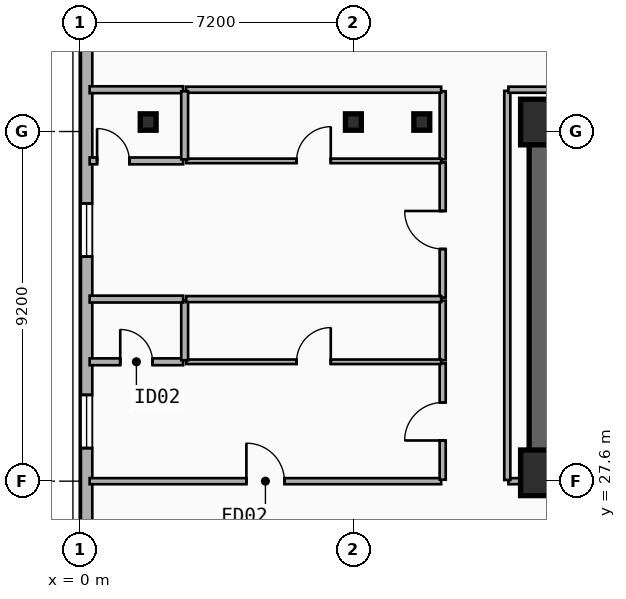
"""IFC4 building model, lengths in metres.
Left out: names, types, materials, properties, quantities, classifications, styles, units other than length and angle.
Written with IfcOpenShell. Run it as: python <this file> out.ifc"""

import sys

from ifc_helpers import new_model, si_unit, direction, frame, frame_2d, origin, origin_2d, place, context, subcontext, project, spatial, rectangle, i_section, extrude, element, fill, save


model = new_model("IFC4")
c1 = context("Model", 3, precision=1e-05, world=origin(), true_north=direction((0.0, 1.0)))
c2 = subcontext(c1, "Body", "Model", "MODEL_VIEW")
j1 = project(units=[si_unit("LENGTHUNIT", "METRE"), si_unit("PLANEANGLEUNIT", "RADIAN")], contexts=[c1])
p1 = place(None, origin())
s1 = spatial("IfcSite", under=j1, at=p1, CompositionType="ELEMENT")
p2 = place(p1, origin())
s2 = spatial("IfcBuilding", under=s1, at=p2, CompositionType="ELEMENT")
p3 = place(p2, frame((0.0, 0.0, 118.8)))
s3 = spatial("IfcBuildingStorey", under=s2, at=p3, CompositionType="ELEMENT", Elevation=118.8)
p4 = place(p3, frame((12.15, 37.05, 0.0), z_axis=(0.0, 0.0, 1.0), x_axis=(1.0, 0.0, 0.0)))
e1 = element("IfcWall", 1, at=p4, inside=s3, PredefinedType="SHEAR", context=c2, shape_type="SweptSolid", body=[
    extrude(rectangle(XDim=33.23, YDim=0.65, at=frame_2d((16.615, 0.0))), origin(), (0.0, 0.0, 1.0), 3.5),
])
p5 = place(p3, frame((21.18, 27.82, 0.0), z_axis=(0.0, 0.0, 1.0), x_axis=(-1.0, 0.0, 0.0)))
e2 = element("IfcWall", 2, at=p5, inside=s3, PredefinedType="SHEAR", context=c2, shape_type="SweptSolid", body=[
    extrude(rectangle(XDim=9.03, YDim=0.65, at=frame_2d((4.515, 0.0))), origin(), (0.0, 0.0, 1.0), 3.5),
])
p6 = place(p5, frame((2.68, 0.0, 0.0)))
e3 = element("IfcOpeningElement", 3, at=p6, cuts=e2, PredefinedType="OPENING", context=c2, shape_type="SweptSolid", body=[
    extrude(rectangle(XDim=1.1, YDim=2.15, at=frame_2d((0.55, 1.075))), frame((0.0, 0.335, 0.0), z_axis=(0.0, -1.0, 0.0), x_axis=(1.0, 0.0, 0.0)), (0.0, 0.0, 1.0), 0.67),
])
p7 = place(p3, frame((12.15, 28.145, 0.0), z_axis=(0.0, 0.0, 1.0), x_axis=(0.0, 1.0, 0.0)))
e4 = element("IfcWall", 4, at=p7, inside=s3, PredefinedType="SHEAR", context=c2, shape_type="SweptSolid", body=[
    extrude(rectangle(XDim=8.58, YDim=0.65, at=frame_2d((4.29, 0.0))), origin(), (0.0, 0.0, 1.0), 3.5),
])
for number, where, z_axis, x_axis in (
    (5, (12.2, 27.82, 0.0), (0.0, 0.0, 1.0), (1.0, 0.0, 0.0)),
    (6, (12.2, 37.05, 0.0), (0.0, 0.0, 1.0), (1.0, 0.0, 0.0)),
):
    element("IfcColumn", number, at=place(p3, frame(where, z_axis=z_axis, x_axis=x_axis)), inside=s3, PredefinedType="COLUMN", context=c2, shape_type="SweptSolid", body=[
        extrude(rectangle(XDim=1.2, YDim=1.2, at=origin_2d()), origin(), (0.0, 0.0, 1.0), 3.5),
    ])
for number, where, z_axis, x_axis in (
    (7, (9.0, 37.05, 0.0), (0.0, 0.0, 1.0), (1.0, 0.0, 0.0)),
    (8, (1.8, 37.05, 0.0), (0.0, 0.0, 1.0), (1.0, 0.0, 0.0)),
    (9, (7.2, 37.05, 0.0), (0.0, 0.0, 1.0), (1.0, 0.0, 0.0)),
):
    element("IfcColumn", number, at=place(p3, frame(where, z_axis=z_axis, x_axis=x_axis)), inside=s3, PredefinedType="COLUMN", context=c2, shape_type="SweptSolid", body=[
        extrude(i_section(OverallWidth=0.418, OverallDepth=0.432, WebThickness=0.035, FlangeThickness=0.056, FilletRadius=0.015, at=origin_2d()), origin(), (0.0, 0.0, 1.0), 3.5),
    ])
p8 = place(p3, frame((0.18, 21.0, 0.0), z_axis=(0.0, 0.0, 1.0), x_axis=(0.0, 1.0, 0.0)))
e10 = element("IfcWall", 10, at=p8, inside=s3, PredefinedType="SOLIDWALL", context=c2, shape_type="SweptSolid", body=[
    extrude(rectangle(XDim=18.0, YDim=0.3, at=frame_2d((9.0, 0.0))), origin(), (0.0, 0.0, 1.0), 3.24),
])
p9 = place(p8, frame((7.47, 0.0, 0.48)))
e11 = element("IfcOpeningElement", 11, at=p9, cuts=e10, PredefinedType="OPENING", context=c2, shape_type="SweptSolid", body=[
    extrude(rectangle(XDim=1.4, YDim=1.8, at=frame_2d((0.7, 0.9))), frame((0.0, 0.16, 0.0), z_axis=(0.0, -1.0, 0.0), x_axis=(1.0, 0.0, 0.0)), (0.0, 0.0, 1.0), 0.32),
])
p10 = place(p8, frame((12.509, 0.0, 0.48)))
e12 = element("IfcOpeningElement", 12, at=p10, cuts=e10, PredefinedType="OPENING", context=c2, shape_type="SweptSolid", body=[
    extrude(rectangle(XDim=1.4, YDim=1.8, at=frame_2d((0.7, 0.9))), frame((0.0, 0.16, 0.0), z_axis=(0.0, -1.0, 0.0), x_axis=(1.0, 0.0, 0.0)), (0.0, 0.0, 1.0), 0.32),
])
p11 = place(p8, frame((0.32, 0.0, 0.65)))
e13 = element("IfcOpeningElement", 13, at=p11, cuts=e10, PredefinedType="OPENING", context=c2, shape_type="SweptSolid", body=[
    extrude(rectangle(XDim=1.4, YDim=1.8, at=frame_2d((0.7, 0.9))), frame((0.0, 0.16, 0.0), z_axis=(0.0, -1.0, 0.0), x_axis=(1.0, 0.0, 0.0)), (0.0, 0.0, 1.0), 0.32),
])
p12 = place(p3, frame((0.26, 27.6, 0.0), z_axis=(0.0, 0.0, 1.0), x_axis=(1.0, 0.0, 0.0)))
e14 = element("IfcWall", 14, at=p12, inside=s3, PredefinedType="PARTITIONING", context=c2, shape_type="SweptSolid", body=[
    extrude(rectangle(XDim=9.25, YDim=0.16, at=frame_2d((4.625, 0.0))), origin(), (0.0, 0.0, 1.0), 2.57),
])
p13 = place(p12, frame((4.125, 0.0, 0.0)))
e15 = element("IfcOpeningElement", 15, at=p13, cuts=e14, PredefinedType="OPENING", context=c2, shape_type="SweptSolid", body=[
    extrude(rectangle(XDim=1.0, YDim=2.15, at=frame_2d((0.5, 1.075))), frame((0.0, 0.09, 0.0), z_axis=(0.0, -1.0, 0.0), x_axis=(1.0, 0.0, 0.0)), (0.0, 0.0, 1.0), 0.18),
])
p14 = place(p3, frame((9.55, 27.64, 0.0), z_axis=(0.0, 0.0, 1.0), x_axis=(0.0, 1.0, 0.0)))
e16 = element("IfcWall", 16, at=p14, inside=s3, PredefinedType="PARTITIONING", context=c2, shape_type="SweptSolid", body=[
    extrude(rectangle(XDim=3.061, YDim=0.16, at=frame_2d((1.531, 0.0))), origin(), (0.0, 0.0, 1.0), 3.24),
])
p15 = place(p14, frame((1.031, 0.0, 0.0)))
e17 = element("IfcOpeningElement", 17, at=p15, cuts=e16, PredefinedType="OPENING", context=c2, shape_type="SweptSolid", body=[
    extrude(rectangle(XDim=1.0, YDim=2.15, at=frame_2d((0.5, 1.075))), frame((0.0, 0.09, 0.0), z_axis=(0.0, -1.0, 0.0), x_axis=(1.0, 0.0, 0.0)), (0.0, 0.0, 1.0), 0.18),
])
p16 = place(p3, frame((9.55, 30.781, 0.0), z_axis=(0.0, 0.0, 1.0), x_axis=(0.0, 1.0, 0.0)))
e18 = element("IfcWall", 18, at=p16, inside=s3, PredefinedType="PARTITIONING", context=c2, shape_type="SweptSolid", body=[
    extrude(rectangle(XDim=1.57, YDim=0.16, at=frame_2d((0.785, 0.0))), origin(), (0.0, 0.0, 1.0), 3.24),
])
p17 = place(p3, frame((9.55, 32.431, 0.0), z_axis=(0.0, 0.0, 1.0), x_axis=(0.0, 1.0, 0.0)))
e19 = element("IfcWall", 19, at=p17, inside=s3, PredefinedType="PARTITIONING", context=c2, shape_type="SweptSolid", body=[
    extrude(rectangle(XDim=3.556, YDim=0.16, at=frame_2d((1.778, 0.0))), origin(), (0.0, 0.0, 1.0), 3.24),
])
p18 = place(p17, frame((1.278, 0.0, 0.0)))
e20 = element("IfcOpeningElement", 20, at=p18, cuts=e19, PredefinedType="OPENING", context=c2, shape_type="SweptSolid", body=[
    extrude(rectangle(XDim=1.0, YDim=2.15, at=frame_2d((0.5, 1.075))), frame((0.0, 0.09, 0.0), z_axis=(0.0, -1.0, 0.0), x_axis=(1.0, 0.0, 0.0)), (0.0, 0.0, 1.0), 0.18),
])
p19 = place(p3, frame((9.55, 36.067, 0.0), z_axis=(0.0, 0.0, 1.0), x_axis=(0.0, 1.0, 0.0)))
e21 = element("IfcWall", 21, at=p19, inside=s3, PredefinedType="PARTITIONING", context=c2, shape_type="SweptSolid", body=[
    extrude(rectangle(XDim=1.793, YDim=0.16, at=frame_2d((0.896, 0.0))), origin(), (0.0, 0.0, 1.0), 2.72),
])
p20 = place(p3, frame((0.26, 37.9, 0.0), z_axis=(0.0, 0.0, 1.0), x_axis=(1.0, 0.0, 0.0)))
e22 = element("IfcWall", 22, at=p20, inside=s3, PredefinedType="PLUMBINGWALL", context=c2, shape_type="SweptSolid", body=[
    extrude(rectangle(XDim=2.46, YDim=0.18, at=frame_2d((1.23, 0.0))), origin(), (0.0, 0.0, 1.0), 3.24),
])
p21 = place(p3, frame((2.8, 37.9, 0.0), z_axis=(0.0, 0.0, 1.0), x_axis=(1.0, 0.0, 0.0)))
e23 = element("IfcWall", 23, at=p21, inside=s3, PredefinedType="PARTITIONING", context=c2, shape_type="SweptSolid", body=[
    extrude(rectangle(XDim=6.71, YDim=0.16, at=frame_2d((3.355, 0.0))), origin(), (0.0, 0.0, 1.0), 3.24),
])
p22 = place(p3, frame((0.26, 30.741, 0.0), z_axis=(0.0, 0.0, 1.0), x_axis=(1.0, 0.0, 0.0)))
e24 = element("IfcWall", 24, at=p22, inside=s3, PredefinedType="PLUMBINGWALL", context=c2, shape_type="SweptSolid", body=[
    extrude(rectangle(XDim=2.46, YDim=0.18, at=frame_2d((1.23, 0.0))), origin(), (0.0, 0.0, 1.0), 2.57),
])
p23 = place(p22, frame((0.805, 0.0, 0.0)))
e25 = element("IfcOpeningElement", 25, at=p23, cuts=e24, PredefinedType="OPENING", context=c2, shape_type="SweptSolid", body=[
    extrude(rectangle(XDim=0.85, YDim=2.1, at=frame_2d((0.425, 1.05))), frame((0.0, 0.1, 0.0), z_axis=(0.0, -1.0, 0.0), x_axis=(1.0, 0.0, 0.0)), (0.0, 0.0, 1.0), 0.2),
])
p24 = place(p3, frame((2.8, 30.741, 0.0), z_axis=(0.0, 0.0, 1.0), x_axis=(1.0, 0.0, 0.0)))
e26 = element("IfcWall", 26, at=p24, inside=s3, PredefinedType="PARTITIONING", context=c2, shape_type="SweptSolid", body=[
    extrude(rectangle(XDim=6.71, YDim=0.12, at=frame_2d((3.355, 0.0))), origin(), (0.0, 0.0, 1.0), 2.57),
])
p25 = place(p24, frame((2.905, 0.0, 0.0)))
e27 = element("IfcOpeningElement", 27, at=p25, cuts=e26, PredefinedType="OPENING", context=c2, shape_type="SweptSolid", body=[
    extrude(rectangle(XDim=0.9, YDim=2.1, at=frame_2d((0.45, 1.05))), frame((0.0, 0.07, 0.0), z_axis=(0.0, -1.0, 0.0), x_axis=(1.0, 0.0, 0.0)), (0.0, 0.0, 1.0), 0.14),
])
p26 = place(p3, frame((2.76, 30.781, 0.0), z_axis=(0.0, 0.0, 1.0), x_axis=(0.0, 1.0, 0.0)))
e28 = element("IfcWall", 28, at=p26, inside=s3, PredefinedType="PLUMBINGWALL", context=c2, shape_type="SweptSolid", body=[
    extrude(rectangle(XDim=1.57, YDim=0.18, at=frame_2d((0.785, 0.0))), origin(), (0.0, 0.0, 1.0), 3.24),
])
p27 = place(p3, frame((0.26, 32.391, 0.0), z_axis=(0.0, 0.0, 1.0), x_axis=(1.0, 0.0, 0.0)))
e29 = element("IfcWall", 29, at=p27, inside=s3, PredefinedType="PLUMBINGWALL", context=c2, shape_type="SweptSolid", body=[
    extrude(rectangle(XDim=2.46, YDim=0.18, at=frame_2d((1.23, 0.0))), origin(), (0.0, 0.0, 1.0), 2.57),
])
p28 = place(p3, frame((2.8, 32.391, 0.0), z_axis=(0.0, 0.0, 1.0), x_axis=(1.0, 0.0, 0.0)))
e30 = element("IfcWall", 30, at=p28, inside=s3, PredefinedType="PARTITIONING", context=c2, shape_type="SweptSolid", body=[
    extrude(rectangle(XDim=6.71, YDim=0.16, at=frame_2d((3.355, 0.0))), origin(), (0.0, 0.0, 1.0), 2.57),
])
p29 = place(p3, frame((0.26, 36.027, 0.0), z_axis=(0.0, 0.0, 1.0), x_axis=(1.0, 0.0, 0.0)))
e31 = element("IfcWall", 31, at=p29, inside=s3, PredefinedType="PLUMBINGWALL", context=c2, shape_type="SweptSolid", body=[
    extrude(rectangle(XDim=2.46, YDim=0.18, at=frame_2d((1.23, 0.0))), origin(), (0.0, 0.0, 1.0), 2.57),
])
p30 = place(p29, frame((0.195, 0.0, 0.0)))
e32 = element("IfcOpeningElement", 32, at=p30, cuts=e31, PredefinedType="OPENING", context=c2, shape_type="SweptSolid", body=[
    extrude(rectangle(XDim=0.85, YDim=2.1, at=frame_2d((0.425, 1.05))), frame((0.0, 0.1, 0.0), z_axis=(0.0, -1.0, 0.0), x_axis=(1.0, 0.0, 0.0)), (0.0, 0.0, 1.0), 0.2),
])
p31 = place(p3, frame((2.8, 36.027, 0.0), z_axis=(0.0, 0.0, 1.0), x_axis=(1.0, 0.0, 0.0)))
e33 = element("IfcWall", 33, at=p31, inside=s3, PredefinedType="PARTITIONING", context=c2, shape_type="SweptSolid", body=[
    extrude(rectangle(XDim=6.71, YDim=0.12, at=frame_2d((3.355, 0.0))), origin(), (0.0, 0.0, 1.0), 2.57),
])
p32 = place(p31, frame((2.905, 0.0, 0.0)))
e34 = element("IfcOpeningElement", 34, at=p32, cuts=e33, PredefinedType="OPENING", context=c2, shape_type="SweptSolid", body=[
    extrude(rectangle(XDim=0.9, YDim=2.1, at=frame_2d((0.45, 1.05))), frame((0.0, 0.07, 0.0), z_axis=(0.0, -1.0, 0.0), x_axis=(1.0, 0.0, 0.0)), (0.0, 0.0, 1.0), 0.14),
])
p33 = place(p3, frame((2.76, 36.067, 0.0), z_axis=(0.0, 0.0, 1.0), x_axis=(0.0, 1.0, 0.0)))
e35 = element("IfcWall", 35, at=p33, inside=s3, PredefinedType="PLUMBINGWALL", context=c2, shape_type="SweptSolid", body=[
    extrude(rectangle(XDim=1.793, YDim=0.18, at=frame_2d((0.896, 0.0))), origin(), (0.0, 0.0, 1.0), 2.72),
])
p34 = place(p3, frame((11.28, 27.6, 0.0), z_axis=(0.0, 0.0, 1.0), x_axis=(1.0, 0.0, 0.0)))
e36 = element("IfcWall", 36, at=p34, inside=s3, PredefinedType="PARTITIONING", context=c2, shape_type="SweptSolid", body=[
    extrude(rectangle(XDim=0.84, YDim=0.16, at=frame_2d((0.42, 0.0))), origin(), (0.0, 0.0, 1.0), 2.28),
])
p35 = place(p3, frame((11.25, 27.63, 0.0), z_axis=(0.0, 0.0, 1.0), x_axis=(0.0, 1.0, 0.0)))
e37 = element("IfcWall", 37, at=p35, inside=s3, PredefinedType="PARTITIONING", context=c2, shape_type="SweptSolid", body=[
    extrude(rectangle(XDim=10.24, YDim=0.16, at=frame_2d((5.12, 0.0))), origin(), (0.0, 0.0, 1.0), 2.72),
])
p36 = place(p3, frame((11.28, 37.9, 0.0), z_axis=(0.0, 0.0, 1.0), x_axis=(1.0, 0.0, 0.0)))
e38 = element("IfcWall", 38, at=p36, inside=s3, PredefinedType="PARTITIONING", context=c2, shape_type="SweptSolid", body=[
    extrude(rectangle(XDim=35.04, YDim=0.16, at=frame_2d((17.52, 0.0))), origin(), (0.0, 0.0, 1.0), 3.24),
])
p37 = place(p9, origin())
e39 = element("IfcWindow", 39, at=p37, inside=s3, PartitioningType="SINGLE_PANEL", PredefinedType="WINDOW", context=c2, shape_type="SweptSolid", body=[
    extrude(rectangle(XDim=1.4, YDim=1.8, at=frame_2d((0.7, 0.9))), frame((0.0, 0.03, 0.0), z_axis=(0.0, -1.0, 0.0), x_axis=(1.0, 0.0, 0.0)), (0.0, 0.0, 1.0), 0.06),
])
fill(e11, e39)
p38 = place(p10, origin())
e40 = element("IfcWindow", 40, at=p38, inside=s3, PartitioningType="SINGLE_PANEL", PredefinedType="WINDOW", context=c2, shape_type="SweptSolid", body=[
    extrude(rectangle(XDim=1.4, YDim=1.8, at=frame_2d((0.7, 0.9))), frame((0.0, 0.03, 0.0), z_axis=(0.0, -1.0, 0.0), x_axis=(1.0, 0.0, 0.0)), (0.0, 0.0, 1.0), 0.06),
])
fill(e12, e40)
p39 = place(p13, origin())
e41 = element("IfcDoor", 41, at=p39, inside=s3, OperationType="SINGLE_SWING_LEFT", PredefinedType="DOOR", context=c2, shape_type="SweptSolid", body=[
    extrude(rectangle(XDim=1.0, YDim=2.15, at=frame_2d((0.5, 1.075))), frame((0.0, 0.025, 0.0), z_axis=(0.0, -1.0, 0.0), x_axis=(1.0, 0.0, 0.0)), (0.0, 0.0, 1.0), 0.05),
])
fill(e15, e41)
p40 = place(p15, origin())
e42 = element("IfcDoor", 42, at=p40, inside=s3, OperationType="SINGLE_SWING_LEFT", PredefinedType="DOOR", context=c2, shape_type="SweptSolid", body=[
    extrude(rectangle(XDim=1.0, YDim=2.15, at=frame_2d((0.5, 1.075))), frame((0.0, 0.025, 0.0), z_axis=(0.0, -1.0, 0.0), x_axis=(1.0, 0.0, 0.0)), (0.0, 0.0, 1.0), 0.05),
])
fill(e17, e42)
p41 = place(p18, origin())
e43 = element("IfcDoor", 43, at=p41, inside=s3, OperationType="SINGLE_SWING_RIGHT", PredefinedType="DOOR", context=c2, shape_type="SweptSolid", body=[
    extrude(rectangle(XDim=1.0, YDim=2.15, at=frame_2d((0.5, 1.075))), frame((0.0, 0.025, 0.0), z_axis=(0.0, -1.0, 0.0), x_axis=(1.0, 0.0, 0.0)), (0.0, 0.0, 1.0), 0.05),
])
fill(e20, e43)
p42 = place(p23, origin())
e44 = element("IfcDoor", 44, at=p42, inside=s3, OperationType="SINGLE_SWING_LEFT", PredefinedType="DOOR", context=c2, shape_type="SweptSolid", body=[
    extrude(rectangle(XDim=0.85, YDim=2.1, at=frame_2d((0.425, 1.05))), frame((0.0, 0.025, 0.0), z_axis=(0.0, -1.0, 0.0), x_axis=(1.0, 0.0, 0.0)), (0.0, 0.0, 1.0), 0.05),
])
fill(e25, e44)
p43 = place(p25, origin())
e45 = element("IfcDoor", 45, at=p43, inside=s3, OperationType="SINGLE_SWING_RIGHT", PredefinedType="DOOR", context=c2, shape_type="SweptSolid", body=[
    extrude(rectangle(XDim=0.9, YDim=2.1, at=frame_2d((0.45, 1.05))), frame((0.0, 0.025, 0.0), z_axis=(0.0, -1.0, 0.0), x_axis=(1.0, 0.0, 0.0)), (0.0, 0.0, 1.0), 0.05),
])
fill(e27, e45)
p44 = place(p30, origin())
e46 = element("IfcDoor", 46, at=p44, inside=s3, OperationType="SINGLE_SWING_LEFT", PredefinedType="DOOR", context=c2, shape_type="SweptSolid", body=[
    extrude(rectangle(XDim=0.85, YDim=2.1, at=frame_2d((0.425, 1.05))), frame((0.0, 0.025, 0.0), z_axis=(0.0, -1.0, 0.0), x_axis=(1.0, 0.0, 0.0)), (0.0, 0.0, 1.0), 0.05),
])
fill(e32, e46)
p45 = place(p32, origin())
e47 = element("IfcDoor", 47, at=p45, inside=s3, OperationType="SINGLE_SWING_RIGHT", PredefinedType="DOOR", context=c2, shape_type="SweptSolid", body=[
    extrude(rectangle(XDim=0.9, YDim=2.1, at=frame_2d((0.45, 1.05))), frame((0.0, 0.025, 0.0), z_axis=(0.0, -1.0, 0.0), x_axis=(1.0, 0.0, 0.0)), (0.0, 0.0, 1.0), 0.05),
])
fill(e34, e47)
save(model, sys.argv[1])
